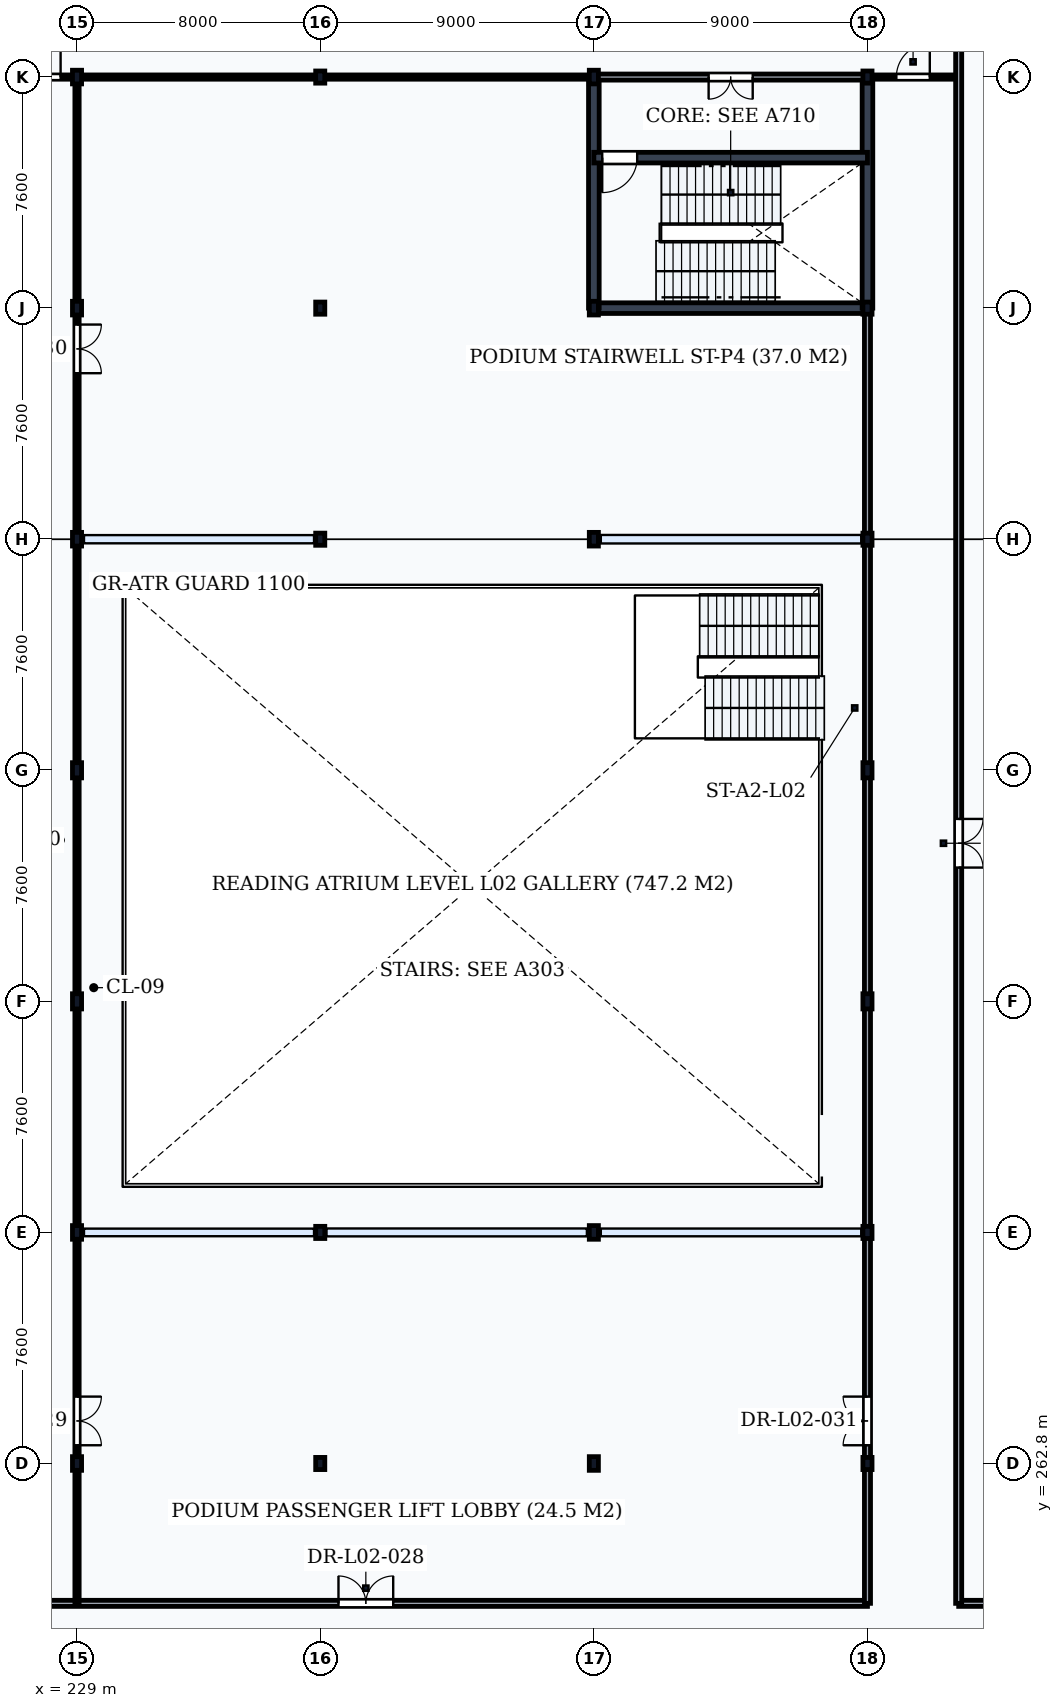
"""IFC4 building model, lengths in metres.
Left out: names, types, materials, properties, quantities, classifications, styles, units other than length and angle.
Written with IfcOpenShell. Run it as: python <this file> out.ifc"""

import sys

from ifc_helpers import new_model, si_unit, direction, frame, frame_2d, origin, origin_2d, place, context, subcontext, project, spatial, rectangle, i_section, extrude, element, fill, save


model = new_model("IFC4")
c1 = context("Model", 3, precision=1e-05, world=origin(), true_north=direction((0.0, 1.0)))
c2 = subcontext(c1, "Body", "Model", "MODEL_VIEW")
j1 = project(units=[si_unit("LENGTHUNIT", "METRE"), si_unit("PLANEANGLEUNIT", "RADIAN")], contexts=[c1])
p1 = place(None, origin())
s1 = spatial("IfcSite", under=j1, at=p1, CompositionType="ELEMENT")
p2 = place(p1, origin())
s2 = spatial("IfcBuilding", under=s1, at=p2, CompositionType="ELEMENT")
p3 = place(p2, frame((0.0, 0.0, 5.4)))
s3 = spatial("IfcBuildingStorey", under=s2, at=p3, CompositionType="ELEMENT", Elevation=5.4)
for number, where, z_axis, x_axis in (
    (1, (229.0, 262.8, 0.0), (0.0, 0.0, 1.0), (1.0, 0.0, 0.0)),
    (2, (229.0, 270.4, 0.0), (0.0, 0.0, 1.0), (1.0, 0.0, 0.0)),
):
    element("IfcColumn", number, at=place(p3, frame(where, z_axis=z_axis, x_axis=x_axis)), inside=s3, PredefinedType="COLUMN", context=c2, shape_type="SweptSolid", body=[
        extrude(i_section(OverallWidth=0.3, OverallDepth=0.45, WebThickness=0.014, FlangeThickness=0.026, FilletRadius=0.027, at=origin_2d()), origin(), (0.0, 0.0, 1.0), 5.1),
    ])
for number, where, z_axis, x_axis in (
    (3, (229.0, 278.0, 0.0), (0.0, 0.0, 1.0), (1.0, 0.0, 0.0)),
    (4, (229.0, 285.6, 0.0), (0.0, 0.0, 1.0), (1.0, 0.0, 0.0)),
):
    element("IfcColumn", number, at=place(p3, frame(where, z_axis=z_axis, x_axis=x_axis)), inside=s3, PredefinedType="COLUMN", context=c2, shape_type="SweptSolid", body=[
        extrude(i_section(OverallWidth=0.3, OverallDepth=0.5, WebThickness=0.014, FlangeThickness=0.028, FilletRadius=0.027, at=origin_2d()), origin(), (0.0, 0.0, 1.0), 5.1),
    ])
for number, where, z_axis, x_axis in (
    (5, (229.0, 293.2, 0.0), (0.0, 0.0, 1.0), (1.0, 0.0, 0.0)),
    (6, (229.0, 300.8, 0.0), (0.0, 0.0, 1.0), (1.0, 0.0, 0.0)),
    (7, (229.0, 308.4, 0.0), (0.0, 0.0, 1.0), (1.0, 0.0, 0.0)),
):
    element("IfcColumn", number, at=place(p3, frame(where, z_axis=z_axis, x_axis=x_axis)), inside=s3, PredefinedType="COLUMN", context=c2, shape_type="SweptSolid", body=[
        extrude(i_section(OverallWidth=0.3, OverallDepth=0.45, WebThickness=0.014, FlangeThickness=0.026, FilletRadius=0.027, at=origin_2d()), origin(), (0.0, 0.0, 1.0), 5.1),
    ])
for number, where, z_axis, x_axis in (
    (8, (237.0, 262.8, 0.0), (0.0, 0.0, 1.0), (1.0, 0.0, 0.0)),
    (9, (237.0, 270.4, 0.0), (0.0, 0.0, 1.0), (1.0, 0.0, 0.0)),
    (10, (237.0, 293.2, 0.0), (0.0, 0.0, 1.0), (1.0, 0.0, 0.0)),
    (11, (237.0, 300.8, 0.0), (0.0, 0.0, 1.0), (1.0, 0.0, 0.0)),
    (12, (237.0, 308.4, 0.0), (0.0, 0.0, 1.0), (1.0, 0.0, 0.0)),
):
    element("IfcColumn", number, at=place(p3, frame(where, z_axis=z_axis, x_axis=x_axis)), inside=s3, PredefinedType="COLUMN", context=c2, shape_type="SweptSolid", body=[
        extrude(i_section(OverallWidth=0.3, OverallDepth=0.4, WebThickness=0.013, FlangeThickness=0.024, FilletRadius=0.027, at=origin_2d()), origin(), (0.0, 0.0, 1.0), 5.1),
    ])
for number, where, z_axis, x_axis in (
    (13, (246.0, 262.8, 0.0), (0.0, 0.0, 1.0), (1.0, 0.0, 0.0)),
    (14, (246.0, 270.4, 0.0), (0.0, 0.0, 1.0), (1.0, 0.0, 0.0)),
    (15, (246.0, 293.2, 0.0), (0.0, 0.0, 1.0), (1.0, 0.0, 0.0)),
    (16, (246.0, 300.8, 0.0), (0.0, 0.0, 1.0), (1.0, 0.0, 0.0)),
    (17, (246.0, 308.4, 0.0), (0.0, 0.0, 1.0), (1.0, 0.0, 0.0)),
):
    element("IfcColumn", number, at=place(p3, frame(where, z_axis=z_axis, x_axis=x_axis)), inside=s3, PredefinedType="COLUMN", context=c2, shape_type="SweptSolid", body=[
        extrude(i_section(OverallWidth=0.3, OverallDepth=0.45, WebThickness=0.014, FlangeThickness=0.026, FilletRadius=0.027, at=origin_2d()), origin(), (0.0, 0.0, 1.0), 5.1),
    ])
for number, where, z_axis, x_axis in (
    (18, (255.0, 262.8, 0.0), (0.0, 0.0, 1.0), (1.0, 0.0, 0.0)),
    (19, (255.0, 270.4, 0.0), (0.0, 0.0, 1.0), (1.0, 0.0, 0.0)),
):
    element("IfcColumn", number, at=place(p3, frame(where, z_axis=z_axis, x_axis=x_axis)), inside=s3, PredefinedType="COLUMN", context=c2, shape_type="SweptSolid", body=[
        extrude(i_section(OverallWidth=0.3, OverallDepth=0.4, WebThickness=0.013, FlangeThickness=0.024, FilletRadius=0.027, at=origin_2d()), origin(), (0.0, 0.0, 1.0), 5.1),
    ])
for number, where, z_axis, x_axis in (
    (20, (255.0, 278.0, 0.0), (0.0, 0.0, 1.0), (1.0, 0.0, 0.0)),
    (21, (255.0, 285.6, 0.0), (0.0, 0.0, 1.0), (1.0, 0.0, 0.0)),
):
    element("IfcColumn", number, at=place(p3, frame(where, z_axis=z_axis, x_axis=x_axis)), inside=s3, PredefinedType="COLUMN", context=c2, shape_type="SweptSolid", body=[
        extrude(i_section(OverallWidth=0.3, OverallDepth=0.5, WebThickness=0.014, FlangeThickness=0.028, FilletRadius=0.027, at=origin_2d()), origin(), (0.0, 0.0, 1.0), 5.1),
    ])
for number, where, z_axis, x_axis in (
    (22, (255.0, 293.2, 0.0), (0.0, 0.0, 1.0), (1.0, 0.0, 0.0)),
    (23, (255.0, 300.8, 0.0), (0.0, 0.0, 1.0), (1.0, 0.0, 0.0)),
    (24, (255.0, 308.4, 0.0), (0.0, 0.0, 1.0), (1.0, 0.0, 0.0)),
):
    element("IfcColumn", number, at=place(p3, frame(where, z_axis=z_axis, x_axis=x_axis)), inside=s3, PredefinedType="COLUMN", context=c2, shape_type="SweptSolid", body=[
        extrude(i_section(OverallWidth=0.3, OverallDepth=0.4, WebThickness=0.013, FlangeThickness=0.024, FilletRadius=0.027, at=origin_2d()), origin(), (0.0, 0.0, 1.0), 5.1),
    ])
p4 = place(p3, frame((246.0, 300.8, 0.0), z_axis=(0.0, 0.0, 1.0), x_axis=(1.0, 0.0, 0.0)))
e25 = element("IfcWall", 25, at=p4, inside=s3, PredefinedType="SHEAR", context=c2, shape_type="SweptSolid", body=[
    extrude(rectangle(XDim=9.0, YDim=0.35, at=frame_2d((4.5, 0.0))), origin(), (0.0, 0.0, 1.0), 4.86),
])
for number, where, z_axis, x_axis in (
    (26, (246.0, 300.8, 0.0), (0.0, 0.0, 1.0), (0.0, 1.0, 0.0)),
    (27, (255.0, 300.8, 0.0), (0.0, 0.0, 1.0), (0.0, 1.0, 0.0)),
):
    element("IfcWall", number, at=place(p3, frame(where, z_axis=z_axis, x_axis=x_axis)), inside=s3, PredefinedType="SHEAR", context=c2, shape_type="SweptSolid", body=[
        extrude(rectangle(XDim=7.6, YDim=0.35, at=frame_2d((3.8, 0.0))), origin(), (0.0, 0.0, 1.0), 4.86),
    ])
p5 = place(p3, frame((246.0, 305.75, 0.0), z_axis=(0.0, 0.0, 1.0), x_axis=(1.0, 0.0, 0.0)))
e28 = element("IfcWall", 28, at=p5, inside=s3, PredefinedType="SHEAR", context=c2, shape_type="SweptSolid", body=[
    extrude(rectangle(XDim=9.0, YDim=0.35, at=frame_2d((4.5, 0.0))), origin(), (0.0, 0.0, 1.0), 4.86),
])
p6 = place(p5, frame((0.275, 0.0, 0.0)))
e29 = element("IfcOpeningElement", 29, at=p6, cuts=e28, PredefinedType="OPENING", context=c2, shape_type="SweptSolid", body=[
    extrude(rectangle(XDim=1.15, YDim=2.15, at=frame_2d((0.575, 1.075))), frame((0.0, 0.19, 0.0), z_axis=(0.0, -1.0, 0.0), x_axis=(1.0, 0.0, 0.0)), (0.0, 0.0, 1.0), 0.38),
])
p7 = place(p3, frame((246.0, 308.4, 0.0), z_axis=(0.0, 0.0, 1.0), x_axis=(1.0, 0.0, 0.0)))
e30 = element("IfcWall", 30, at=p7, inside=s3, PredefinedType="PARTITIONING", context=c2, shape_type="SweptSolid", body=[
    extrude(rectangle(XDim=9.0, YDim=0.2, at=frame_2d((4.5, 0.0))), origin(), (0.0, 0.0, 1.0), 4.308),
])
p8 = place(p7, frame((3.775, 0.0, 0.0)))
e31 = element("IfcOpeningElement", 31, at=p8, cuts=e30, PredefinedType="OPENING", context=c2, shape_type="SweptSolid", body=[
    extrude(rectangle(XDim=1.45, YDim=2.2, at=frame_2d((0.725, 1.1))), frame((0.0, 0.115, 0.0), z_axis=(0.0, -1.0, 0.0), x_axis=(1.0, 0.0, 0.0)), (0.0, 0.0, 1.0), 0.23),
])
p9 = place(p3, frame((160.5, 258.2, 0.0), z_axis=(0.0, 0.0, 1.0), x_axis=(1.0, 0.0, 0.0)))
e32 = element("IfcWall", 32, at=p9, inside=s3, PredefinedType="PARTITIONING", context=c2, shape_type="SweptSolid", body=[
    extrude(rectangle(XDim=94.5, YDim=0.2, at=frame_2d((47.25, 0.0))), origin(), (0.0, 0.0, 1.0), 4.86),
])
p10 = place(p9, frame((24.1, 0.0, 0.0)))
e33 = element("IfcOpeningElement", 33, at=p10, cuts=e32, PredefinedType="OPENING", context=c2, shape_type="SweptSolid", body=[
    extrude(rectangle(XDim=1.8, YDim=2.4, at=frame_2d((0.9, 1.2))), frame((0.0, 0.115, 0.0), z_axis=(0.0, -1.0, 0.0), x_axis=(1.0, 0.0, 0.0)), (0.0, 0.0, 1.0), 0.23),
])
p11 = place(p9, frame((77.1, 0.0, 0.0)))
e34 = element("IfcOpeningElement", 34, at=p11, cuts=e32, PredefinedType="OPENING", context=c2, shape_type="SweptSolid", body=[
    extrude(rectangle(XDim=1.8, YDim=2.4, at=frame_2d((0.9, 1.2))), frame((0.0, 0.115, 0.0), z_axis=(0.0, -1.0, 0.0), x_axis=(1.0, 0.0, 0.0)), (0.0, 0.0, 1.0), 0.23),
])
p12 = place(p3, frame((229.0, 258.2, 0.0), z_axis=(0.0, 0.0, 1.0), x_axis=(0.0, 1.0, 0.0)))
e35 = element("IfcWall", 35, at=p12, inside=s3, PredefinedType="PARTITIONING", context=c2, shape_type="SweptSolid", body=[
    extrude(rectangle(XDim=50.2, YDim=0.14, at=frame_2d((25.1, 0.0))), origin(), (0.0, 0.0, 1.0), 1.908),
])
p13 = place(p12, frame((5.2, 0.0, 0.0)))
e36 = element("IfcOpeningElement", 36, at=p13, cuts=e35, PredefinedType="OPENING", context=c2, shape_type="SweptSolid", body=[
    extrude(rectangle(XDim=1.6, YDim=2.25, at=frame_2d((0.8, 1.125))), frame((0.0, 0.085, 0.0), z_axis=(0.0, -1.0, 0.0), x_axis=(1.0, 0.0, 0.0)), (0.0, 0.0, 1.0), 0.17),
])
p14 = place(p12, frame((40.46, 0.0, 0.0)))
e37 = element("IfcOpeningElement", 37, at=p14, cuts=e35, PredefinedType="OPENING", context=c2, shape_type="SweptSolid", body=[
    extrude(rectangle(XDim=1.6, YDim=2.25, at=frame_2d((0.8, 1.125))), frame((0.0, 0.085, 0.0), z_axis=(0.0, -1.0, 0.0), x_axis=(1.0, 0.0, 0.0)), (0.0, 0.0, 1.0), 0.17),
])
p15 = place(p3, frame((255.0, 258.2, 0.0), z_axis=(0.0, 0.0, 1.0), x_axis=(0.0, 1.0, 0.0)))
e38 = element("IfcWall", 38, at=p15, inside=s3, PredefinedType="PARTITIONING", context=c2, shape_type="SweptSolid", body=[
    extrude(rectangle(XDim=42.6, YDim=0.2, at=frame_2d((21.3, 0.0))), origin(), (0.0, 0.0, 1.0), 1.908),
])
p16 = place(p15, frame((5.2, 0.0, 0.0)))
e39 = element("IfcOpeningElement", 39, at=p16, cuts=e38, PredefinedType="OPENING", context=c2, shape_type="SweptSolid", body=[
    extrude(rectangle(XDim=1.6, YDim=2.25, at=frame_2d((0.8, 1.125))), frame((0.0, 0.115, 0.0), z_axis=(0.0, -1.0, 0.0), x_axis=(1.0, 0.0, 0.0)), (0.0, 0.0, 1.0), 0.23),
])
p17 = place(p3, frame((205.0, 308.4, 0.0), z_axis=(0.0, 0.0, 1.0), x_axis=(1.0, 0.0, 0.0)))
e40 = element("IfcWall", 40, at=p17, inside=s3, PredefinedType="PARTITIONING", context=c2, shape_type="SweptSolid", body=[
    extrude(rectangle(XDim=41.0, YDim=0.14, at=frame_2d((20.5, 0.0))), origin(), (0.0, 0.0, 1.0), 4.308),
])
p18 = place(p17, frame((21.66, 0.0, 0.0)))
e41 = element("IfcOpeningElement", 41, at=p18, cuts=e40, PredefinedType="OPENING", context=c2, shape_type="SweptSolid", body=[
    extrude(rectangle(XDim=1.8, YDim=2.4, at=frame_2d((0.9, 1.2))), frame((0.0, 0.085, 0.0), z_axis=(0.0, -1.0, 0.0), x_axis=(1.0, 0.0, 0.0)), (0.0, 0.0, 1.0), 0.17),
])
p19 = place(p3, frame((255.0, 308.4, 0.0), z_axis=(0.0, 0.0, 1.0), x_axis=(1.0, 0.0, 0.0)))
e42 = element("IfcWall", 42, at=p19, inside=s3, PredefinedType="PARTITIONING", context=c2, shape_type="SweptSolid", body=[
    extrude(rectangle(XDim=3.0, YDim=0.14, at=frame_2d((1.5, 0.0))), origin(), (0.0, 0.0, 1.0), 4.308),
])
p20 = place(p19, frame((0.95, 0.0, 0.0)))
e43 = element("IfcOpeningElement", 43, at=p20, cuts=e42, PredefinedType="OPENING", context=c2, shape_type="SweptSolid", body=[
    extrude(rectangle(XDim=1.1, YDim=2.1, at=frame_2d((0.55, 1.05))), frame((0.0, 0.085, 0.0), z_axis=(0.0, -1.0, 0.0), x_axis=(1.0, 0.0, 0.0)), (0.0, 0.0, 1.0), 0.17),
])
p21 = place(p3, frame((258.0, 258.2, 0.0), z_axis=(0.0, 0.0, 1.0), x_axis=(1.0, 0.0, 0.0)))
e44 = element("IfcWall", 44, at=p21, inside=s3, PredefinedType="PARTITIONING", context=c2, shape_type="SweptSolid", body=[
    extrude(rectangle(XDim=15.0, YDim=0.2, at=frame_2d((7.5, 0.0))), origin(), (0.0, 0.0, 1.0), 4.86),
])
p22 = place(p21, frame((6.7, 0.0, 0.0)))
e45 = element("IfcOpeningElement", 45, at=p22, cuts=e44, PredefinedType="OPENING", context=c2, shape_type="SweptSolid", body=[
    extrude(rectangle(XDim=1.6, YDim=2.25, at=frame_2d((0.8, 1.125))), frame((0.0, 0.115, 0.0), z_axis=(0.0, -1.0, 0.0), x_axis=(1.0, 0.0, 0.0)), (0.0, 0.0, 1.0), 0.23),
])
p23 = place(p3, frame((258.0, 258.2, 0.0), z_axis=(0.0, 0.0, 1.0), x_axis=(0.0, 1.0, 0.0)))
e46 = element("IfcWall", 46, at=p23, inside=s3, PredefinedType="PARTITIONING", context=c2, shape_type="SweptSolid", body=[
    extrude(rectangle(XDim=79.8, YDim=0.2, at=frame_2d((39.9, 0.0))), origin(), (0.0, 0.0, 1.0), 4.85),
])
p24 = place(p23, frame((24.2, 0.0, 0.0)))
e47 = element("IfcOpeningElement", 47, at=p24, cuts=e46, PredefinedType="OPENING", context=c2, shape_type="SweptSolid", body=[
    extrude(rectangle(XDim=1.6, YDim=2.25, at=frame_2d((0.8, 1.125))), frame((0.0, 0.115, 0.0), z_axis=(0.0, -1.0, 0.0), x_axis=(1.0, 0.0, 0.0)), (0.0, 0.0, 1.0), 0.23),
])
p25 = place(p6, frame((1.15, 0.0, 0.0), z_axis=(0.0, 0.0, 1.0), x_axis=(-1.0, 0.0, 0.0)))
e48 = element("IfcDoor", 48, at=p25, inside=s3, OperationType="SINGLE_SWING_RIGHT", PredefinedType="DOOR", context=c2, shape_type="SweptSolid", body=[
    extrude(rectangle(XDim=1.15, YDim=2.15, at=frame_2d((0.575, 1.075))), frame((0.0, 0.025, 0.0), z_axis=(0.0, -1.0, 0.0), x_axis=(1.0, 0.0, 0.0)), (0.0, 0.0, 1.0), 0.05),
])
fill(e29, e48)
p26 = place(p8, frame((1.45, 0.0, 0.0), z_axis=(0.0, 0.0, 1.0), x_axis=(-1.0, 0.0, 0.0)))
e49 = element("IfcDoor", 49, at=p26, inside=s3, OperationType="DOUBLE_DOOR_SINGLE_SWING", PredefinedType="DOOR", context=c2, shape_type="SweptSolid", body=[
    extrude(rectangle(XDim=1.45, YDim=2.2, at=frame_2d((0.725, 1.1))), frame((0.0, 0.025, 0.0), z_axis=(0.0, -1.0, 0.0), x_axis=(1.0, 0.0, 0.0)), (0.0, 0.0, 1.0), 0.05),
])
fill(e31, e49)
p27 = place(p11, origin())
e50 = element("IfcDoor", 50, at=p27, inside=s3, OperationType="DOUBLE_DOOR_SINGLE_SWING", PredefinedType="DOOR", context=c2, shape_type="SweptSolid", body=[
    extrude(rectangle(XDim=1.8, YDim=2.4, at=frame_2d((0.9, 1.2))), frame((0.0, 0.025, 0.0), z_axis=(0.0, -1.0, 0.0), x_axis=(1.0, 0.0, 0.0)), (0.0, 0.0, 1.0), 0.05),
])
fill(e34, e50)
p28 = place(p13, frame((1.6, 0.0, 0.0), z_axis=(0.0, 0.0, 1.0), x_axis=(-1.0, 0.0, 0.0)))
e51 = element("IfcDoor", 51, at=p28, inside=s3, OperationType="DOUBLE_DOOR_SINGLE_SWING", PredefinedType="DOOR", context=c2, shape_type="SweptSolid", body=[
    extrude(rectangle(XDim=1.6, YDim=2.25, at=frame_2d((0.8, 1.125))), frame((0.0, 0.025, 0.0), z_axis=(0.0, -1.0, 0.0), x_axis=(1.0, 0.0, 0.0)), (0.0, 0.0, 1.0), 0.05),
])
fill(e36, e51)
p29 = place(p14, frame((1.6, 0.0, 0.0), z_axis=(0.0, 0.0, 1.0), x_axis=(-1.0, 0.0, 0.0)))
e52 = element("IfcDoor", 52, at=p29, inside=s3, OperationType="DOUBLE_DOOR_SINGLE_SWING", PredefinedType="DOOR", context=c2, shape_type="SweptSolid", body=[
    extrude(rectangle(XDim=1.6, YDim=2.25, at=frame_2d((0.8, 1.125))), frame((0.0, 0.025, 0.0), z_axis=(0.0, -1.0, 0.0), x_axis=(1.0, 0.0, 0.0)), (0.0, 0.0, 1.0), 0.05),
])
fill(e37, e52)
p30 = place(p16, origin())
e53 = element("IfcDoor", 53, at=p30, inside=s3, OperationType="DOUBLE_DOOR_SINGLE_SWING", PredefinedType="DOOR", context=c2, shape_type="SweptSolid", body=[
    extrude(rectangle(XDim=1.6, YDim=2.25, at=frame_2d((0.8, 1.125))), frame((0.0, 0.025, 0.0), z_axis=(0.0, -1.0, 0.0), x_axis=(1.0, 0.0, 0.0)), (0.0, 0.0, 1.0), 0.05),
])
fill(e39, e53)
p31 = place(p18, origin())
e54 = element("IfcDoor", 54, at=p31, inside=s3, OperationType="DOUBLE_DOOR_SINGLE_SWING", PredefinedType="DOOR", context=c2, shape_type="SweptSolid", body=[
    extrude(rectangle(XDim=1.8, YDim=2.4, at=frame_2d((0.9, 1.2))), frame((0.0, 0.025, 0.0), z_axis=(0.0, -1.0, 0.0), x_axis=(1.0, 0.0, 0.0)), (0.0, 0.0, 1.0), 0.05),
])
fill(e41, e54)
p32 = place(p20, frame((1.1, 0.0, 0.0), z_axis=(0.0, 0.0, 1.0), x_axis=(-1.0, 0.0, 0.0)))
e55 = element("IfcDoor", 55, at=p32, inside=s3, OperationType="SINGLE_SWING_LEFT", PredefinedType="DOOR", context=c2, shape_type="SweptSolid", body=[
    extrude(rectangle(XDim=1.1, YDim=2.1, at=frame_2d((0.55, 1.05))), frame((0.0, 0.025, 0.0), z_axis=(0.0, -1.0, 0.0), x_axis=(1.0, 0.0, 0.0)), (0.0, 0.0, 1.0), 0.05),
])
fill(e43, e55)
p33 = place(p24, frame((1.6, 0.0, 0.0), z_axis=(0.0, 0.0, 1.0), x_axis=(-1.0, 0.0, 0.0)))
e56 = element("IfcDoor", 56, at=p33, inside=s3, OperationType="DOUBLE_DOOR_SINGLE_SWING", PredefinedType="DOOR", context=c2, shape_type="SweptSolid", body=[
    extrude(rectangle(XDim=1.6, YDim=2.25, at=frame_2d((0.8, 1.125))), frame((0.0, 0.025, 0.0), z_axis=(0.0, -1.0, 0.0), x_axis=(1.0, 0.0, 0.0)), (0.0, 0.0, 1.0), 0.05),
])
fill(e47, e56)
save(model, sys.argv[1])
